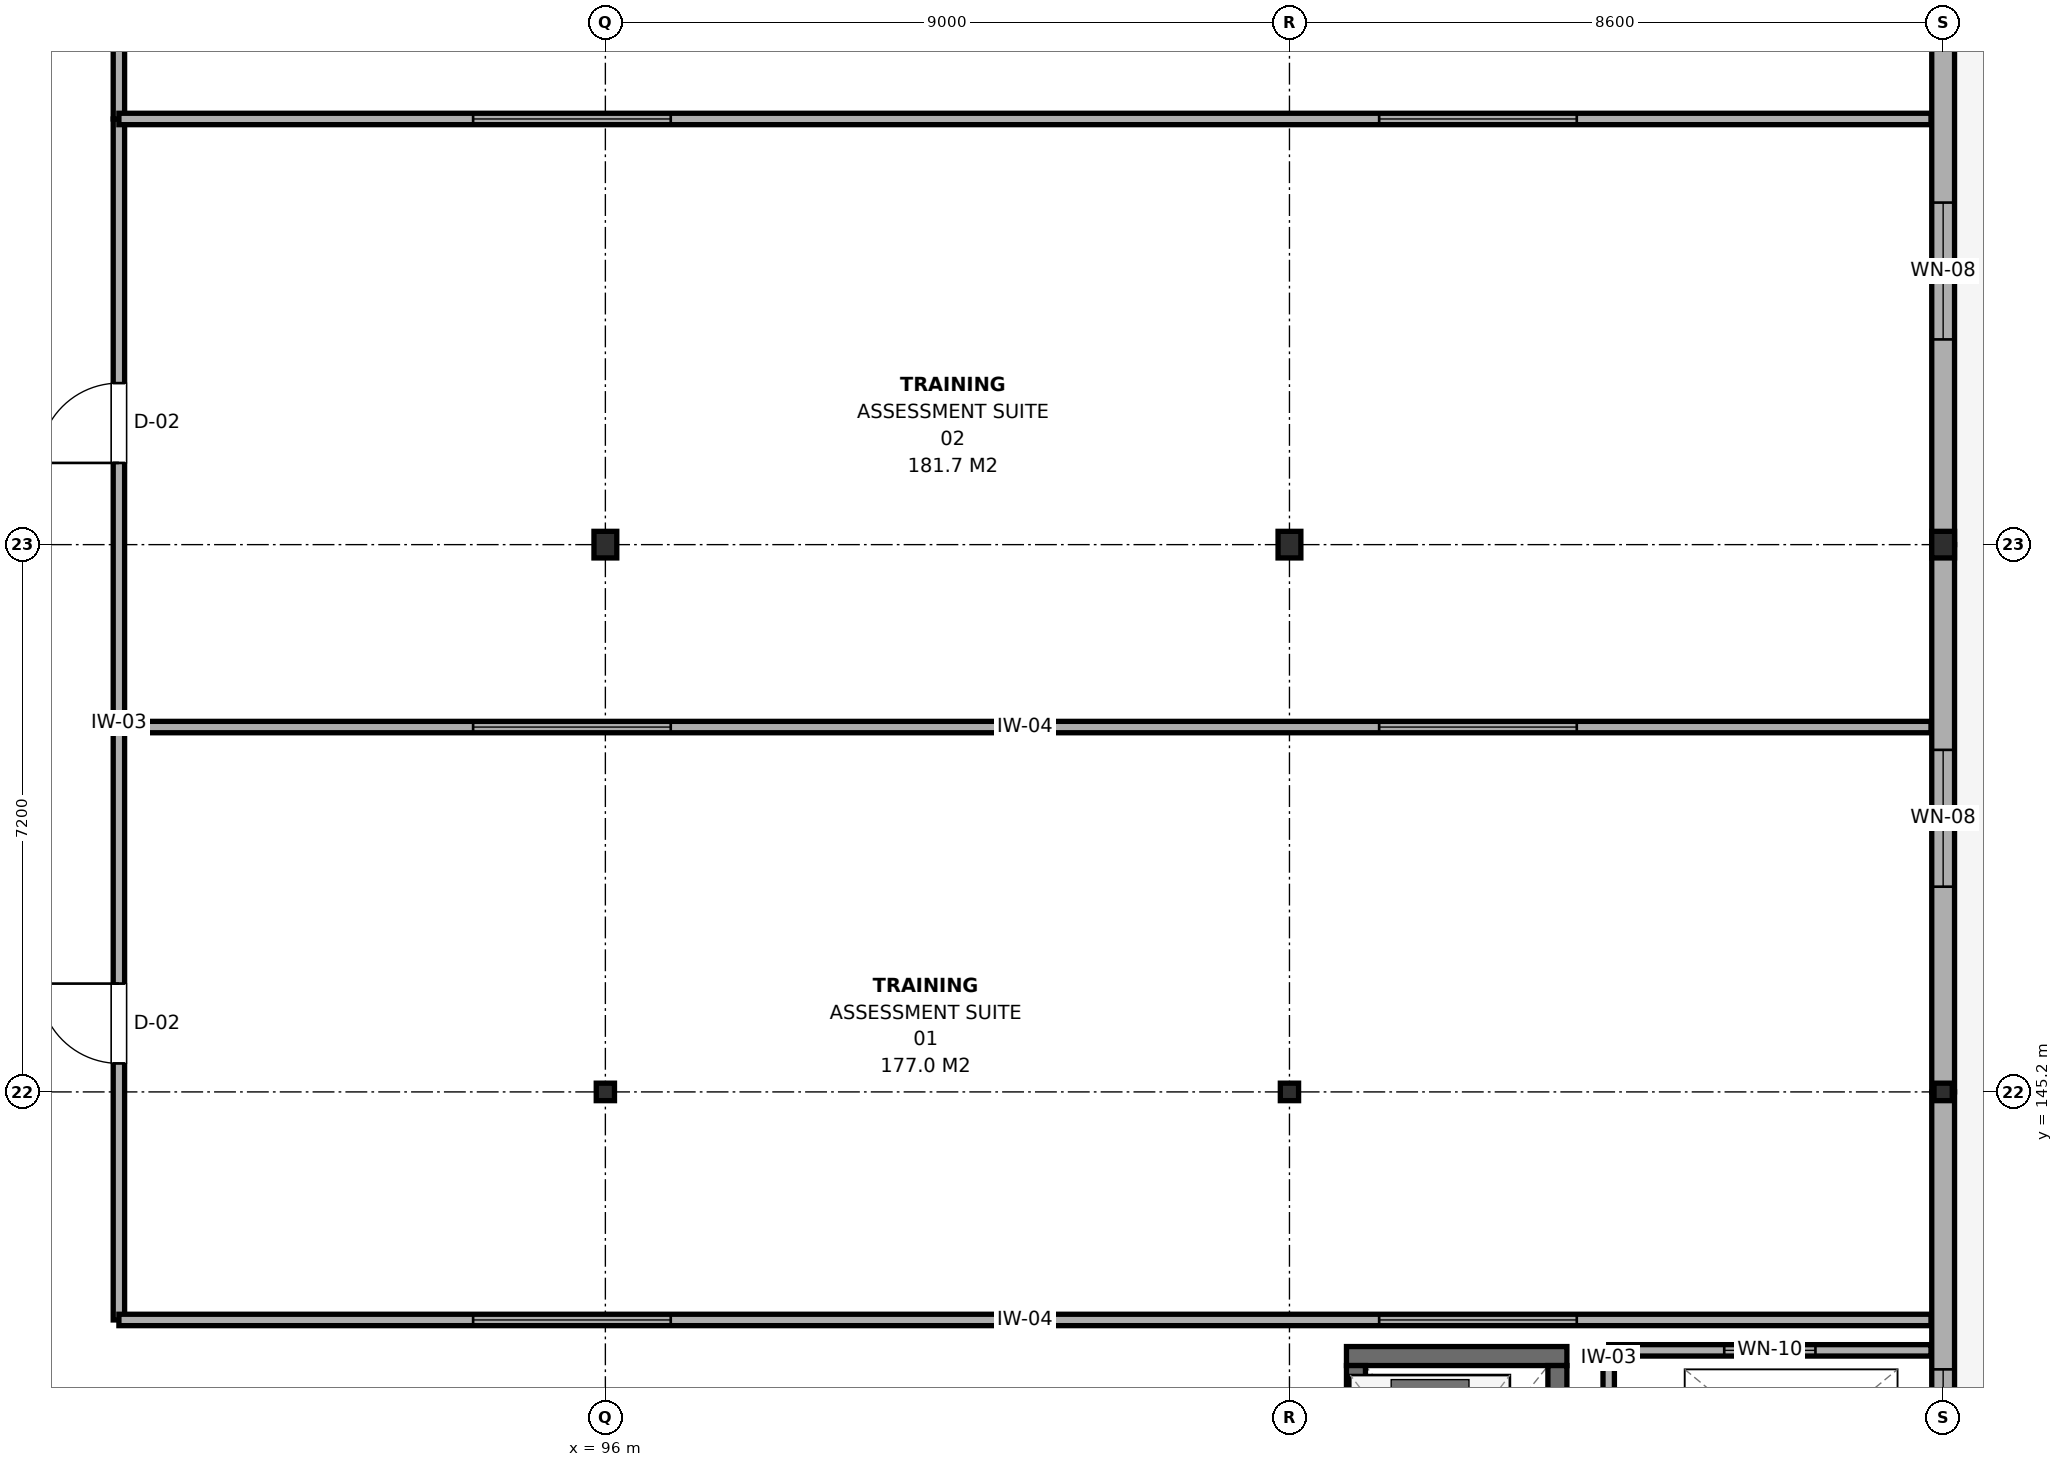
"""IFC4 building model, lengths in metres.
Left out: names, types, materials, properties, quantities, classifications, styles, units other than length and angle.
Written with IfcOpenShell. Run it as: python <this file> out.ifc"""

import sys

from ifc_helpers import new_model, si_unit, direction, frame, frame_2d, origin, origin_2d, place, context, subcontext, project, spatial, rectangle, i_section, extrude, element, fill, save


model = new_model("IFC4")
c1 = context("Model", 3, precision=1e-05, world=origin(), true_north=direction((0.0, 1.0)))
c2 = subcontext(c1, "Body", "Model", "MODEL_VIEW")
j1 = project(units=[si_unit("LENGTHUNIT", "METRE"), si_unit("PLANEANGLEUNIT", "RADIAN")], contexts=[c1])
p1 = place(None, origin())
s1 = spatial("IfcSite", under=j1, at=p1, CompositionType="ELEMENT")
p2 = place(p1, origin())
s2 = spatial("IfcBuilding", under=s1, at=p2, CompositionType="ELEMENT")
p3 = place(p2, frame((0.0, 0.0, 21.0)))
s3 = spatial("IfcBuildingStorey", under=s2, at=p3, CompositionType="ELEMENT", Elevation=21.0)
p4 = place(p3, frame((96.0, 145.2, 0.0), z_axis=(0.0, 0.0, 1.0), x_axis=(1.0, 0.0, 0.0)))
e1 = element("IfcColumn", 1, at=p4, inside=s3, PredefinedType="COLUMN", context=c2, shape_type="SweptSolid", body=[
    extrude(i_section(OverallWidth=0.24, OverallDepth=0.23, WebThickness=0.008, FlangeThickness=0.012, FilletRadius=0.021, at=origin_2d()), origin(), (0.0, 0.0, 1.0), 3.7),
])
p5 = place(p3, frame((96.0, 152.4, 0.0), z_axis=(0.0, 0.0, 1.0), x_axis=(1.0, 0.0, 0.0)))
e2 = element("IfcColumn", 2, at=p5, inside=s3, PredefinedType="COLUMN", context=c2, shape_type="SweptSolid", body=[
    extrude(i_section(OverallWidth=0.3, OverallDepth=0.35, WebThickness=0.01, FlangeThickness=0.018, FilletRadius=0.027, at=origin_2d()), origin(), (0.0, 0.0, 1.0), 3.7),
])
p6 = place(p3, frame((105.0, 145.2, 0.0), z_axis=(0.0, 0.0, 1.0), x_axis=(1.0, 0.0, 0.0)))
e3 = element("IfcColumn", 3, at=p6, inside=s3, PredefinedType="COLUMN", context=c2, shape_type="SweptSolid", body=[
    extrude(i_section(OverallWidth=0.24, OverallDepth=0.23, WebThickness=0.008, FlangeThickness=0.012, FilletRadius=0.021, at=origin_2d()), origin(), (0.0, 0.0, 1.0), 3.7),
])
p7 = place(p3, frame((105.0, 152.4, 0.0), z_axis=(0.0, 0.0, 1.0), x_axis=(1.0, 0.0, 0.0)))
e4 = element("IfcColumn", 4, at=p7, inside=s3, PredefinedType="COLUMN", context=c2, shape_type="SweptSolid", body=[
    extrude(i_section(OverallWidth=0.3, OverallDepth=0.35, WebThickness=0.01, FlangeThickness=0.018, FilletRadius=0.027, at=origin_2d()), origin(), (0.0, 0.0, 1.0), 3.7),
])
p8 = place(p3, frame((113.6, 145.2, 0.0), z_axis=(0.0, 0.0, 1.0), x_axis=(1.0, 0.0, 0.0)))
e5 = element("IfcColumn", 5, at=p8, inside=s3, PredefinedType="COLUMN", context=c2, shape_type="SweptSolid", body=[
    extrude(i_section(OverallWidth=0.24, OverallDepth=0.23, WebThickness=0.008, FlangeThickness=0.012, FilletRadius=0.021, at=origin_2d()), origin(), (0.0, 0.0, 1.0), 3.7),
])
p9 = place(p3, frame((113.6, 152.4, 0.0), z_axis=(0.0, 0.0, 1.0), x_axis=(1.0, 0.0, 0.0)))
e6 = element("IfcColumn", 6, at=p9, inside=s3, PredefinedType="COLUMN", context=c2, shape_type="SweptSolid", body=[
    extrude(i_section(OverallWidth=0.3, OverallDepth=0.35, WebThickness=0.01, FlangeThickness=0.018, FilletRadius=0.027, at=origin_2d()), origin(), (0.0, 0.0, 1.0), 3.7),
])
p10 = place(p3, frame((105.75, 141.725, 0.0), z_axis=(0.0, 0.0, 1.0), x_axis=(1.0, 0.0, 0.0)))
e7 = element("IfcWall", 7, at=p10, inside=s3, PredefinedType="SHEAR", context=c2, shape_type="SweptSolid", body=[
    extrude(rectangle(XDim=2.9, YDim=0.25, at=frame_2d((1.45, 0.0))), origin(), (0.0, 0.0, 1.0), 3.7),
])
p11 = place(p3, frame((105.875, 138.6, 0.0), z_axis=(0.0, 0.0, 1.0), x_axis=(0.0, 1.0, 0.0)))
e8 = element("IfcWall", 8, at=p11, inside=s3, PredefinedType="SHEAR", context=c2, shape_type="SweptSolid", body=[
    extrude(rectangle(XDim=3.0, YDim=0.25, at=frame_2d((1.5, 0.0))), origin(), (0.0, 0.0, 1.0), 3.7),
])
p12 = place(p11, frame((0.925, 0.0, 0.0)))
e9 = element("IfcOpeningElement", 9, at=p12, cuts=e8, PredefinedType="OPENING", context=c2, shape_type="SweptSolid", body=[
    extrude(rectangle(XDim=1.15, YDim=2.15, at=frame_2d((0.575, 1.075))), frame((0.0, 0.14, 0.0), z_axis=(0.0, -1.0, 0.0), x_axis=(1.0, 0.0, 0.0)), (0.0, 0.0, 1.0), 0.28),
])
p13 = place(p3, frame((108.525, 138.6, 0.0), z_axis=(0.0, 0.0, 1.0), x_axis=(0.0, 1.0, 0.0)))
e10 = element("IfcWall", 10, at=p13, inside=s3, PredefinedType="SHEAR", context=c2, shape_type="SweptSolid", body=[
    extrude(rectangle(XDim=3.0, YDim=0.25, at=frame_2d((1.5, 0.0))), origin(), (0.0, 0.0, 1.0), 3.7),
])
p14 = place(p3, frame((113.6, 138.0, 0.0), z_axis=(0.0, 0.0, 1.0), x_axis=(0.0, 1.0, 0.0)))
e11 = element("IfcWall", 11, at=p14, inside=s3, PredefinedType="SOLIDWALL", context=c2, shape_type="SweptSolid", body=[
    extrude(rectangle(XDim=7.2, YDim=0.3, at=frame_2d((3.6, 0.0))), origin(), (0.0, 0.0, 1.0), 3.195),
])
p15 = place(p14, frame((1.75, 0.0, 0.65)))
e12 = element("IfcOpeningElement", 12, at=p15, cuts=e11, PredefinedType="OPENING", context=c2, shape_type="SweptSolid", body=[
    extrude(rectangle(XDim=1.8, YDim=1.2, at=frame_2d((0.9, 0.6))), frame((0.0, 0.165, 0.0), z_axis=(0.0, -1.0, 0.0), x_axis=(1.0, 0.0, 0.0)), (0.0, 0.0, 1.0), 0.33),
])
p16 = place(p3, frame((113.6, 145.2, 0.0), z_axis=(0.0, 0.0, 1.0), x_axis=(0.0, 1.0, 0.0)))
e13 = element("IfcWall", 13, at=p16, inside=s3, PredefinedType="SOLIDWALL", context=c2, shape_type="SweptSolid", body=[
    extrude(rectangle(XDim=7.2, YDim=0.3, at=frame_2d((3.6, 0.0))), origin(), (0.0, 0.0, 1.0), 3.245),
])
p17 = place(p16, frame((2.7, 0.0, 0.65)))
e14 = element("IfcOpeningElement", 14, at=p17, cuts=e13, PredefinedType="OPENING", context=c2, shape_type="SweptSolid", body=[
    extrude(rectangle(XDim=1.8, YDim=1.2, at=frame_2d((0.9, 0.6))), frame((0.0, 0.165, 0.0), z_axis=(0.0, -1.0, 0.0), x_axis=(1.0, 0.0, 0.0)), (0.0, 0.0, 1.0), 0.33),
])
p18 = place(p3, frame((113.6, 152.4, 0.0), z_axis=(0.0, 0.0, 1.0), x_axis=(0.0, 1.0, 0.0)))
e15 = element("IfcWall", 15, at=p18, inside=s3, PredefinedType="SOLIDWALL", context=c2, shape_type="SweptSolid", body=[
    extrude(rectangle(XDim=7.2, YDim=0.3, at=frame_2d((3.6, 0.0))), origin(), (0.0, 0.0, 1.0), 3.095),
])
p19 = place(p18, frame((2.7, 0.0, 0.65)))
e16 = element("IfcOpeningElement", 16, at=p19, cuts=e15, PredefinedType="OPENING", context=c2, shape_type="SweptSolid", body=[
    extrude(rectangle(XDim=1.8, YDim=1.2, at=frame_2d((0.9, 0.6))), frame((0.0, 0.165, 0.0), z_axis=(0.0, -1.0, 0.0), x_axis=(1.0, 0.0, 0.0)), (0.0, 0.0, 1.0), 0.33),
])
p20 = place(p3, frame((109.2, 141.8, 0.0), z_axis=(0.0, 0.0, 1.0), x_axis=(1.0, 0.0, 0.0)))
e17 = element("IfcWall", 17, at=p20, inside=s3, PredefinedType="PARTITIONING", context=c2, shape_type="SweptSolid", body=[
    extrude(rectangle(XDim=4.24, YDim=0.15, at=frame_2d((2.12, 0.0))), origin(), (0.0, 0.0, 1.0), 3.245),
])
p21 = place(p20, frame((1.52, 0.0, 0.95)))
e18 = element("IfcOpeningElement", 18, at=p21, cuts=e17, PredefinedType="OPENING", context=c2, shape_type="SweptSolid", body=[
    extrude(rectangle(XDim=1.2, YDim=1.5, at=frame_2d((0.6, 0.75))), frame((0.0, 0.09, 0.0), z_axis=(0.0, -1.0, 0.0), x_axis=(1.0, 0.0, 0.0)), (0.0, 0.0, 1.0), 0.18),
])
p22 = place(p3, frame((109.2, 139.0, 0.0), z_axis=(0.0, 0.0, 1.0), x_axis=(0.0, 1.0, 0.0)))
e19 = element("IfcWall", 19, at=p22, inside=s3, PredefinedType="PARTITIONING", context=c2, shape_type="SweptSolid", body=[
    extrude(rectangle(XDim=2.8, YDim=0.15, at=frame_2d((1.4, 0.0))), origin(), (0.0, 0.0, 1.0), 3.695),
])
p23 = place(p22, frame((0.975, 0.0, 0.0)))
e20 = element("IfcOpeningElement", 20, at=p23, cuts=e19, PredefinedType="OPENING", context=c2, shape_type="SweptSolid", body=[
    extrude(rectangle(XDim=0.85, YDim=2.1, at=frame_2d((0.425, 1.05))), frame((0.0, 0.09, 0.0), z_axis=(0.0, -1.0, 0.0), x_axis=(1.0, 0.0, 0.0)), (0.0, 0.0, 1.0), 0.18),
])
p24 = place(p3, frame((89.6, 142.2, 0.0), z_axis=(0.0, 0.0, 1.0), x_axis=(0.0, 1.0, 0.0)))
e21 = element("IfcWall", 21, at=p24, inside=s3, PredefinedType="PARTITIONING", context=c2, shape_type="SweptSolid", body=[
    extrude(rectangle(XDim=7.8, YDim=0.15, at=frame_2d((3.9, 0.0))), origin(), (0.0, 0.0, 1.0), 3.205),
])
p25 = place(p24, frame((3.375, 0.0, 0.0)))
e22 = element("IfcOpeningElement", 22, at=p25, cuts=e21, PredefinedType="OPENING", context=c2, shape_type="SweptSolid", body=[
    extrude(rectangle(XDim=1.05, YDim=2.15, at=frame_2d((0.525, 1.075))), frame((0.0, 0.09, 0.0), z_axis=(0.0, -1.0, 0.0), x_axis=(1.0, 0.0, 0.0)), (0.0, 0.0, 1.0), 0.18),
])
p26 = place(p3, frame((89.6, 142.2, 0.0), z_axis=(0.0, 0.0, 1.0), x_axis=(1.0, 0.0, 0.0)))
e23 = element("IfcWall", 23, at=p26, inside=s3, PredefinedType="PARTITIONING", context=c2, shape_type="SweptSolid", body=[
    extrude(rectangle(XDim=23.84, YDim=0.15, at=frame_2d((11.92, 0.0))), origin(), (0.0, 0.0, 1.0), 3.245),
])
p27 = place(p26, frame((4.66, 0.0, 0.95)))
e24 = element("IfcOpeningElement", 24, at=p27, cuts=e23, PredefinedType="OPENING", context=c2, shape_type="SweptSolid", body=[
    extrude(rectangle(XDim=2.6, YDim=1.5, at=frame_2d((1.3, 0.75))), frame((0.0, 0.09, 0.0), z_axis=(0.0, -1.0, 0.0), x_axis=(1.0, 0.0, 0.0)), (0.0, 0.0, 1.0), 0.18),
])
p28 = place(p26, frame((16.58, 0.0, 0.95)))
e25 = element("IfcOpeningElement", 25, at=p28, cuts=e23, PredefinedType="OPENING", context=c2, shape_type="SweptSolid", body=[
    extrude(rectangle(XDim=2.6, YDim=1.5, at=frame_2d((1.3, 0.75))), frame((0.0, 0.09, 0.0), z_axis=(0.0, -1.0, 0.0), x_axis=(1.0, 0.0, 0.0)), (0.0, 0.0, 1.0), 0.18),
])
p29 = place(p3, frame((89.6, 150.0, 0.0), z_axis=(0.0, 0.0, 1.0), x_axis=(0.0, 1.0, 0.0)))
e26 = element("IfcWall", 26, at=p29, inside=s3, PredefinedType="PARTITIONING", context=c2, shape_type="SweptSolid", body=[
    extrude(rectangle(XDim=8.0, YDim=0.15, at=frame_2d((4.0, 0.0))), origin(), (0.0, 0.0, 1.0), 3.105),
])
p30 = place(p29, frame((3.475, 0.0, 0.0)))
e27 = element("IfcOpeningElement", 27, at=p30, cuts=e26, PredefinedType="OPENING", context=c2, shape_type="SweptSolid", body=[
    extrude(rectangle(XDim=1.05, YDim=2.15, at=frame_2d((0.525, 1.075))), frame((0.0, 0.09, 0.0), z_axis=(0.0, -1.0, 0.0), x_axis=(1.0, 0.0, 0.0)), (0.0, 0.0, 1.0), 0.18),
])
p31 = place(p3, frame((89.6, 150.0, 0.0), z_axis=(0.0, 0.0, 1.0), x_axis=(1.0, 0.0, 0.0)))
e28 = element("IfcWall", 28, at=p31, inside=s3, PredefinedType="PARTITIONING", context=c2, shape_type="SweptSolid", body=[
    extrude(rectangle(XDim=23.84, YDim=0.15, at=frame_2d((11.92, 0.0))), origin(), (0.0, 0.0, 1.0), 3.345),
])
p32 = place(p31, frame((4.66, 0.0, 0.95)))
e29 = element("IfcOpeningElement", 29, at=p32, cuts=e28, PredefinedType="OPENING", context=c2, shape_type="SweptSolid", body=[
    extrude(rectangle(XDim=2.6, YDim=1.5, at=frame_2d((1.3, 0.75))), frame((0.0, 0.09, 0.0), z_axis=(0.0, -1.0, 0.0), x_axis=(1.0, 0.0, 0.0)), (0.0, 0.0, 1.0), 0.18),
])
p33 = place(p31, frame((16.58, 0.0, 0.95)))
e30 = element("IfcOpeningElement", 30, at=p33, cuts=e28, PredefinedType="OPENING", context=c2, shape_type="SweptSolid", body=[
    extrude(rectangle(XDim=2.6, YDim=1.5, at=frame_2d((1.3, 0.75))), frame((0.0, 0.09, 0.0), z_axis=(0.0, -1.0, 0.0), x_axis=(1.0, 0.0, 0.0)), (0.0, 0.0, 1.0), 0.18),
])
p34 = place(p3, frame((89.6, 158.0, 0.0), z_axis=(0.0, 0.0, 1.0), x_axis=(0.0, 1.0, 0.0)))
e31 = element("IfcWall", 31, at=p34, inside=s3, PredefinedType="PARTITIONING", context=c2, shape_type="SweptSolid", body=[
    extrude(rectangle(XDim=4.447, YDim=0.15, at=frame_2d((2.224, 0.0))), origin(), (0.0, 0.0, 1.0), 3.305),
])
p35 = place(p34, frame((1.749, 0.0, 0.0)))
e32 = element("IfcOpeningElement", 32, at=p35, cuts=e31, PredefinedType="OPENING", context=c2, shape_type="SweptSolid", body=[
    extrude(rectangle(XDim=0.95, YDim=2.15, at=frame_2d((0.475, 1.075))), frame((0.0, 0.09, 0.0), z_axis=(0.0, -1.0, 0.0), x_axis=(1.0, 0.0, 0.0)), (0.0, 0.0, 1.0), 0.18),
])
p36 = place(p3, frame((89.6, 158.0, 0.0), z_axis=(0.0, 0.0, 1.0), x_axis=(1.0, 0.0, 0.0)))
e33 = element("IfcWall", 33, at=p36, inside=s3, PredefinedType="PARTITIONING", context=c2, shape_type="SweptSolid", body=[
    extrude(rectangle(XDim=23.84, YDim=0.15, at=frame_2d((11.92, 0.0))), origin(), (0.0, 0.0, 1.0), 3.365),
])
p37 = place(p36, frame((4.66, 0.0, 0.95)))
e34 = element("IfcOpeningElement", 34, at=p37, cuts=e33, PredefinedType="OPENING", context=c2, shape_type="SweptSolid", body=[
    extrude(rectangle(XDim=2.6, YDim=1.5, at=frame_2d((1.3, 0.75))), frame((0.0, 0.09, 0.0), z_axis=(0.0, -1.0, 0.0), x_axis=(1.0, 0.0, 0.0)), (0.0, 0.0, 1.0), 0.18),
])
p38 = place(p36, frame((16.58, 0.0, 0.95)))
e35 = element("IfcOpeningElement", 35, at=p38, cuts=e33, PredefinedType="OPENING", context=c2, shape_type="SweptSolid", body=[
    extrude(rectangle(XDim=2.6, YDim=1.5, at=frame_2d((1.3, 0.75))), frame((0.0, 0.09, 0.0), z_axis=(0.0, -1.0, 0.0), x_axis=(1.0, 0.0, 0.0)), (0.0, 0.0, 1.0), 0.18),
])
p39 = place(p15, origin())
e36 = element("IfcWindow", 36, at=p39, inside=s3, PartitioningType="SINGLE_PANEL", PredefinedType="WINDOW", context=c2, shape_type="SweptSolid", body=[
    extrude(rectangle(XDim=1.8, YDim=1.2, at=frame_2d((0.9, 0.6))), frame((0.0, 0.03, 0.0), z_axis=(0.0, -1.0, 0.0), x_axis=(1.0, 0.0, 0.0)), (0.0, 0.0, 1.0), 0.06),
])
fill(e12, e36)
p40 = place(p17, origin())
e37 = element("IfcWindow", 37, at=p40, inside=s3, PartitioningType="SINGLE_PANEL", PredefinedType="WINDOW", context=c2, shape_type="SweptSolid", body=[
    extrude(rectangle(XDim=1.8, YDim=1.2, at=frame_2d((0.9, 0.6))), frame((0.0, 0.03, 0.0), z_axis=(0.0, -1.0, 0.0), x_axis=(1.0, 0.0, 0.0)), (0.0, 0.0, 1.0), 0.06),
])
fill(e14, e37)
p41 = place(p19, origin())
e38 = element("IfcWindow", 38, at=p41, inside=s3, PartitioningType="SINGLE_PANEL", PredefinedType="WINDOW", context=c2, shape_type="SweptSolid", body=[
    extrude(rectangle(XDim=1.8, YDim=1.2, at=frame_2d((0.9, 0.6))), frame((0.0, 0.03, 0.0), z_axis=(0.0, -1.0, 0.0), x_axis=(1.0, 0.0, 0.0)), (0.0, 0.0, 1.0), 0.06),
])
fill(e16, e38)
p42 = place(p21, origin())
e39 = element("IfcWindow", 39, at=p42, inside=s3, PartitioningType="SINGLE_PANEL", PredefinedType="WINDOW", context=c2, shape_type="SweptSolid", body=[
    extrude(rectangle(XDim=1.2, YDim=1.5, at=frame_2d((0.6, 0.75))), frame((0.0, 0.03, 0.0), z_axis=(0.0, -1.0, 0.0), x_axis=(1.0, 0.0, 0.0)), (0.0, 0.0, 1.0), 0.06),
])
fill(e18, e39)
p43 = place(p25, origin())
e40 = element("IfcDoor", 40, at=p43, inside=s3, OperationType="SINGLE_SWING_RIGHT", PredefinedType="DOOR", context=c2, shape_type="SweptSolid", body=[
    extrude(rectangle(XDim=1.05, YDim=2.15, at=frame_2d((0.525, 1.075))), frame((0.0, 0.025, 0.0), z_axis=(0.0, -1.0, 0.0), x_axis=(1.0, 0.0, 0.0)), (0.0, 0.0, 1.0), 0.05),
])
fill(e22, e40)
p44 = place(p27, origin())
e41 = element("IfcWindow", 41, at=p44, inside=s3, PartitioningType="SINGLE_PANEL", PredefinedType="WINDOW", context=c2, shape_type="SweptSolid", body=[
    extrude(rectangle(XDim=2.6, YDim=1.5, at=frame_2d((1.3, 0.75))), frame((0.0, 0.03, 0.0), z_axis=(0.0, -1.0, 0.0), x_axis=(1.0, 0.0, 0.0)), (0.0, 0.0, 1.0), 0.06),
])
fill(e24, e41)
p45 = place(p28, origin())
e42 = element("IfcWindow", 42, at=p45, inside=s3, PartitioningType="SINGLE_PANEL", PredefinedType="WINDOW", context=c2, shape_type="SweptSolid", body=[
    extrude(rectangle(XDim=2.6, YDim=1.5, at=frame_2d((1.3, 0.75))), frame((0.0, 0.03, 0.0), z_axis=(0.0, -1.0, 0.0), x_axis=(1.0, 0.0, 0.0)), (0.0, 0.0, 1.0), 0.06),
])
fill(e25, e42)
p46 = place(p30, origin())
e43 = element("IfcDoor", 43, at=p46, inside=s3, OperationType="SINGLE_SWING_LEFT", PredefinedType="DOOR", context=c2, shape_type="SweptSolid", body=[
    extrude(rectangle(XDim=1.05, YDim=2.15, at=frame_2d((0.525, 1.075))), frame((0.0, 0.025, 0.0), z_axis=(0.0, -1.0, 0.0), x_axis=(1.0, 0.0, 0.0)), (0.0, 0.0, 1.0), 0.05),
])
fill(e27, e43)
p47 = place(p32, origin())
e44 = element("IfcWindow", 44, at=p47, inside=s3, PartitioningType="SINGLE_PANEL", PredefinedType="WINDOW", context=c2, shape_type="SweptSolid", body=[
    extrude(rectangle(XDim=2.6, YDim=1.5, at=frame_2d((1.3, 0.75))), frame((0.0, 0.03, 0.0), z_axis=(0.0, -1.0, 0.0), x_axis=(1.0, 0.0, 0.0)), (0.0, 0.0, 1.0), 0.06),
])
fill(e29, e44)
p48 = place(p33, origin())
e45 = element("IfcWindow", 45, at=p48, inside=s3, PartitioningType="SINGLE_PANEL", PredefinedType="WINDOW", context=c2, shape_type="SweptSolid", body=[
    extrude(rectangle(XDim=2.6, YDim=1.5, at=frame_2d((1.3, 0.75))), frame((0.0, 0.03, 0.0), z_axis=(0.0, -1.0, 0.0), x_axis=(1.0, 0.0, 0.0)), (0.0, 0.0, 1.0), 0.06),
])
fill(e30, e45)
p49 = place(p37, origin())
e46 = element("IfcWindow", 46, at=p49, inside=s3, PartitioningType="SINGLE_PANEL", PredefinedType="WINDOW", context=c2, shape_type="SweptSolid", body=[
    extrude(rectangle(XDim=2.6, YDim=1.5, at=frame_2d((1.3, 0.75))), frame((0.0, 0.03, 0.0), z_axis=(0.0, -1.0, 0.0), x_axis=(1.0, 0.0, 0.0)), (0.0, 0.0, 1.0), 0.06),
])
fill(e34, e46)
p50 = place(p38, origin())
e47 = element("IfcWindow", 47, at=p50, inside=s3, PartitioningType="SINGLE_PANEL", PredefinedType="WINDOW", context=c2, shape_type="SweptSolid", body=[
    extrude(rectangle(XDim=2.6, YDim=1.5, at=frame_2d((1.3, 0.75))), frame((0.0, 0.03, 0.0), z_axis=(0.0, -1.0, 0.0), x_axis=(1.0, 0.0, 0.0)), (0.0, 0.0, 1.0), 0.06),
])
fill(e35, e47)
save(model, sys.argv[1])
